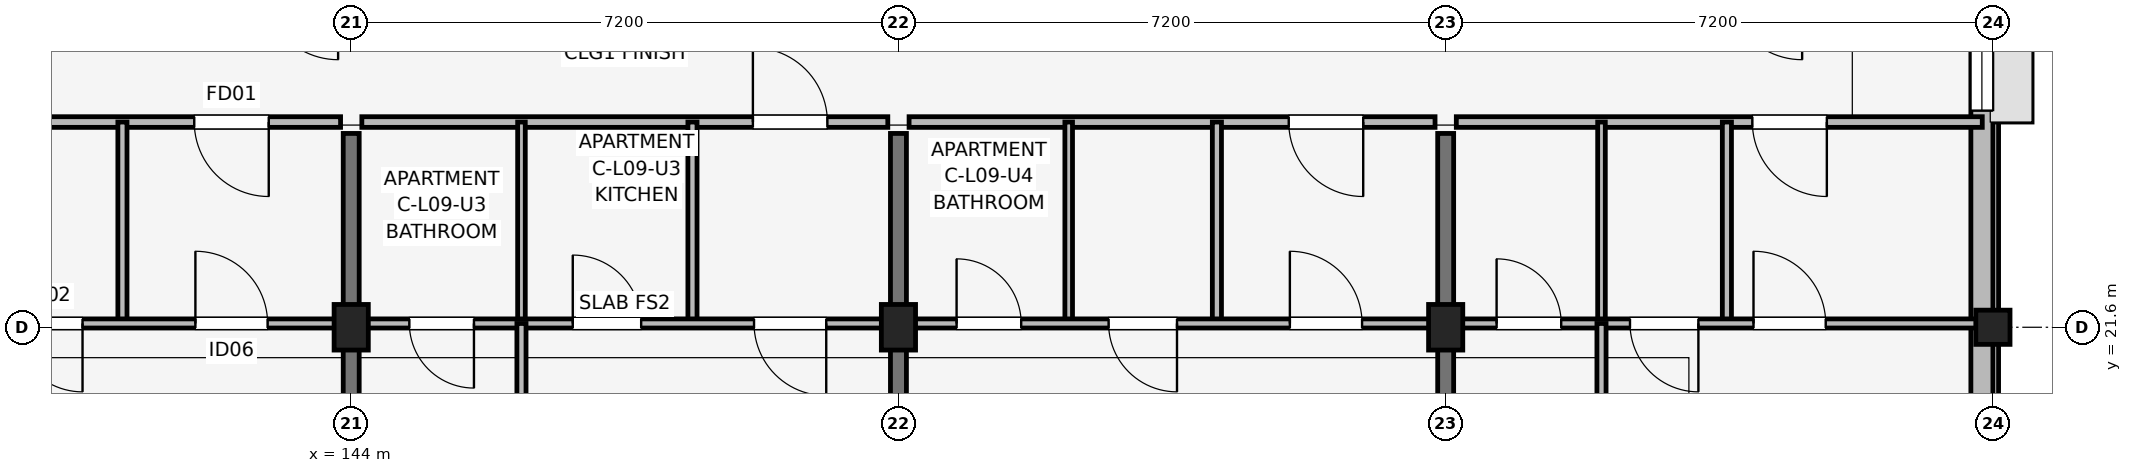
"""IFC4 building model, lengths in metres.
Left out: names, types, materials, properties, quantities, classifications, styles, units other than length and angle.
Written with IfcOpenShell. Run it as: python <this file> out.ifc"""

import sys

from ifc_helpers import new_model, si_unit, direction, frame, frame_2d, origin, origin_2d, place, context, subcontext, project, spatial, rectangle, extrude, element, fill, save


model = new_model("IFC4")
c1 = context("Model", 3, precision=1e-05, world=origin(), true_north=direction((0.0, 1.0)))
c2 = subcontext(c1, "Body", "Model", "MODEL_VIEW")
j1 = project(units=[si_unit("LENGTHUNIT", "METRE"), si_unit("PLANEANGLEUNIT", "RADIAN")], contexts=[c1])
p1 = place(None, origin())
s1 = spatial("IfcSite", under=j1, at=p1, CompositionType="ELEMENT")
p2 = place(p1, origin())
s2 = spatial("IfcBuilding", under=s1, at=p2, CompositionType="ELEMENT")
p3 = place(p2, frame((0.0, 0.0, 30.75)))
s3 = spatial("IfcBuildingStorey", under=s2, at=p3, CompositionType="ELEMENT", Elevation=30.75)
for number, where, z_axis, x_axis in (
    (1, (144.0, 21.6, 0.0), (0.0, 0.0, 1.0), (1.0, 0.0, 0.0)),
    (2, (151.2, 21.6, 0.0), (0.0, 0.0, 1.0), (1.0, 0.0, 0.0)),
    (3, (158.4, 21.6, 0.0), (0.0, 0.0, 1.0), (1.0, 0.0, 0.0)),
):
    element("IfcColumn", number, at=place(p3, frame(where, z_axis=z_axis, x_axis=x_axis)), inside=s3, PredefinedType="COLUMN", context=c2, shape_type="SweptSolid", body=[
        extrude(rectangle(XDim=0.45, YDim=0.6, at=origin_2d()), origin(), (0.0, 0.0, 1.0), 3.15),
    ])
p4 = place(p3, frame((165.6, 21.6, 0.0), z_axis=(0.0, 0.0, 1.0), x_axis=(1.0, 0.0, 0.0)))
e4 = element("IfcColumn", 4, at=p4, inside=s3, PredefinedType="COLUMN", context=c2, shape_type="SweptSolid", body=[
    extrude(rectangle(XDim=0.45, YDim=0.45, at=origin_2d()), origin(), (0.0, 0.0, 1.0), 3.15),
])
for number, where, z_axis, x_axis in (
    (5, (144.0, 14.75, 0.0), (0.0, 0.0, 1.0), (0.0, 1.0, 0.0)),
    (6, (151.2, 14.75, 0.0), (0.0, 0.0, 1.0), (0.0, 1.0, 0.0)),
    (7, (158.4, 14.75, 0.0), (0.0, 0.0, 1.0), (0.0, 1.0, 0.0)),
):
    element("IfcWall", number, at=place(p3, frame(where, z_axis=z_axis, x_axis=x_axis)), inside=s3, PredefinedType="SHEAR", context=c2, shape_type="SweptSolid", body=[
        extrude(rectangle(XDim=9.4, YDim=0.21, at=frame_2d((4.7, 0.0))), origin(), (0.0, 0.0, 1.0), 3.15),
    ])
p5 = place(p3, frame((165.455, 17.4, 0.0), z_axis=(0.0, 0.0, 1.0), x_axis=(0.0, 1.0, 0.0)))
e8 = element("IfcWall", 8, at=p5, inside=s3, PredefinedType="SOLIDWALL", context=c2, shape_type="SweptSolid", body=[
    extrude(rectangle(XDim=15.6, YDim=0.29, at=frame_2d((7.8, 0.0))), origin(), (0.0, 0.0, 1.0), 2.48),
])
p6 = place(p5, frame((7.05, 0.0, 1.05)))
e9 = element("IfcOpeningElement", 9, at=p6, cuts=e8, PredefinedType="OPENING", context=c2, shape_type="SweptSolid", body=[
    extrude(rectangle(XDim=1.5, YDim=1.15, at=frame_2d((0.75, 0.575))), frame((0.0, 0.155, 0.0), z_axis=(0.0, -1.0, 0.0), x_axis=(1.0, 0.0, 0.0)), (0.0, 0.0, 1.0), 0.31),
])
p7 = place(p5, frame((1.363, 0.0, 0.75)))
e10 = element("IfcOpeningElement", 10, at=p7, cuts=e8, PredefinedType="OPENING", context=c2, shape_type="SweptSolid", body=[
    extrude(rectangle(XDim=1.42, YDim=1.6, at=frame_2d((0.71, 0.8))), frame((0.0, 0.155, 0.0), z_axis=(0.0, -1.0, 0.0), x_axis=(1.0, 0.0, 0.0)), (0.0, 0.0, 1.0), 0.31),
])
p8 = place(p3, frame((136.94, 24.3, 0.0), z_axis=(0.0, 0.0, 1.0), x_axis=(1.0, 0.0, 0.0)))
e11 = element("IfcWall", 11, at=p8, inside=s3, PredefinedType="PARTITIONING", context=c2, shape_type="SweptSolid", body=[
    extrude(rectangle(XDim=6.92, YDim=0.14, at=frame_2d((3.46, 0.0))), origin(), (0.0, 0.0, 1.0), 2.38),
])
p9 = place(p8, frame((5.975, 0.0, 0.0), z_axis=(0.0, 0.0, 1.0), x_axis=(-1.0, 0.0, 0.0)))
e12 = element("IfcOpeningElement", 12, at=p9, cuts=e11, PredefinedType="OPENING", context=c2, shape_type="SweptSolid", body=[
    extrude(rectangle(XDim=0.98, YDim=2.1, at=frame_2d((0.49, 1.05))), frame((0.0, 0.08, 0.0), z_axis=(0.0, -1.0, 0.0), x_axis=(1.0, 0.0, 0.0)), (0.0, 0.0, 1.0), 0.16),
])
p10 = place(p3, frame((140.99, 21.65, 0.0), z_axis=(0.0, 0.0, 1.0), x_axis=(0.0, 1.0, 0.0)))
e13 = element("IfcWall", 13, at=p10, inside=s3, PredefinedType="PARTITIONING", context=c2, shape_type="SweptSolid", body=[
    extrude(rectangle(XDim=2.65, YDim=0.12, at=frame_2d((1.325, 0.0))), origin(), (0.0, 0.0, 1.0), 2.38),
])
p11 = place(p3, frame((136.94, 21.65, 0.0), z_axis=(0.0, 0.0, 1.0), x_axis=(1.0, 0.0, 0.0)))
e14 = element("IfcWall", 14, at=p11, inside=s3, PredefinedType="PARTITIONING", context=c2, shape_type="SweptSolid", body=[
    extrude(rectangle(XDim=6.92, YDim=0.12, at=frame_2d((3.46, 0.0))), origin(), (0.0, 0.0, 1.0), 2.38),
])
p12 = place(p11, frame((0.625, 0.0, 0.0)))
e15 = element("IfcOpeningElement", 15, at=p12, cuts=e14, PredefinedType="OPENING", context=c2, shape_type="SweptSolid", body=[
    extrude(rectangle(XDim=0.85, YDim=2.08, at=frame_2d((0.425, 1.04))), frame((0.0, 0.07, 0.0), z_axis=(0.0, -1.0, 0.0), x_axis=(1.0, 0.0, 0.0)), (0.0, 0.0, 1.0), 0.14),
])
p13 = place(p11, frame((3.525, 0.0, 0.0), z_axis=(0.0, 0.0, 1.0), x_axis=(-1.0, 0.0, 0.0)))
e16 = element("IfcOpeningElement", 16, at=p13, cuts=e14, PredefinedType="OPENING", context=c2, shape_type="SweptSolid", body=[
    extrude(rectangle(XDim=0.9, YDim=2.08, at=frame_2d((0.45, 1.04))), frame((0.0, 0.07, 0.0), z_axis=(0.0, -1.0, 0.0), x_axis=(1.0, 0.0, 0.0)), (0.0, 0.0, 1.0), 0.14),
])
p14 = place(p11, frame((5.01, 0.0, 0.0)))
e17 = element("IfcOpeningElement", 17, at=p14, cuts=e14, PredefinedType="OPENING", context=c2, shape_type="SweptSolid", body=[
    extrude(rectangle(XDim=0.95, YDim=2.08, at=frame_2d((0.475, 1.04))), frame((0.0, 0.07, 0.0), z_axis=(0.0, -1.0, 0.0), x_axis=(1.0, 0.0, 0.0)), (0.0, 0.0, 1.0), 0.14),
])
p15 = place(p3, frame((144.14, 24.3, 0.0), z_axis=(0.0, 0.0, 1.0), x_axis=(1.0, 0.0, 0.0)))
e18 = element("IfcWall", 18, at=p15, inside=s3, PredefinedType="PARTITIONING", context=c2, shape_type="SweptSolid", body=[
    extrude(rectangle(XDim=6.92, YDim=0.14, at=frame_2d((3.46, 0.0))), origin(), (0.0, 0.0, 1.0), 2.38),
])
p16 = place(p15, frame((5.145, 0.0, 0.0)))
e19 = element("IfcOpeningElement", 19, at=p16, cuts=e18, PredefinedType="OPENING", context=c2, shape_type="SweptSolid", body=[
    extrude(rectangle(XDim=0.98, YDim=2.1, at=frame_2d((0.49, 1.05))), frame((0.0, 0.08, 0.0), z_axis=(0.0, -1.0, 0.0), x_axis=(1.0, 0.0, 0.0)), (0.0, 0.0, 1.0), 0.16),
])
p17 = place(p3, frame((146.24, 21.65, 0.0), z_axis=(0.0, 0.0, 1.0), x_axis=(0.0, 1.0, 0.0)))
e20 = element("IfcWall", 20, at=p17, inside=s3, PredefinedType="PARTITIONING", context=c2, shape_type="SweptSolid", body=[
    extrude(rectangle(XDim=2.65, YDim=0.1, at=frame_2d((1.325, 0.0))), origin(), (0.0, 0.0, 1.0), 2.38),
])
p18 = place(p3, frame((148.49, 21.65, 0.0), z_axis=(0.0, 0.0, 1.0), x_axis=(0.0, 1.0, 0.0)))
e21 = element("IfcWall", 21, at=p18, inside=s3, PredefinedType="PARTITIONING", context=c2, shape_type="SweptSolid", body=[
    extrude(rectangle(XDim=2.65, YDim=0.12, at=frame_2d((1.325, 0.0))), origin(), (0.0, 0.0, 1.0), 2.38),
])
p19 = place(p3, frame((144.14, 21.65, 0.0), z_axis=(0.0, 0.0, 1.0), x_axis=(1.0, 0.0, 0.0)))
e22 = element("IfcWall", 22, at=p19, inside=s3, PredefinedType="PARTITIONING", context=c2, shape_type="SweptSolid", body=[
    extrude(rectangle(XDim=6.92, YDim=0.12, at=frame_2d((3.46, 0.0))), origin(), (0.0, 0.0, 1.0), 2.38),
])
p20 = place(p19, frame((1.475, 0.0, 0.0), z_axis=(0.0, 0.0, 1.0), x_axis=(-1.0, 0.0, 0.0)))
e23 = element("IfcOpeningElement", 23, at=p20, cuts=e22, PredefinedType="OPENING", context=c2, shape_type="SweptSolid", body=[
    extrude(rectangle(XDim=0.85, YDim=2.08, at=frame_2d((0.425, 1.04))), frame((0.0, 0.07, 0.0), z_axis=(0.0, -1.0, 0.0), x_axis=(1.0, 0.0, 0.0)), (0.0, 0.0, 1.0), 0.14),
])
p21 = place(p19, frame((2.775, 0.0, 0.0)))
e24 = element("IfcOpeningElement", 24, at=p21, cuts=e22, PredefinedType="OPENING", context=c2, shape_type="SweptSolid", body=[
    extrude(rectangle(XDim=0.9, YDim=2.08, at=frame_2d((0.45, 1.04))), frame((0.0, 0.07, 0.0), z_axis=(0.0, -1.0, 0.0), x_axis=(1.0, 0.0, 0.0)), (0.0, 0.0, 1.0), 0.14),
])
p22 = place(p19, frame((6.11, 0.0, 0.0), z_axis=(0.0, 0.0, 1.0), x_axis=(-1.0, 0.0, 0.0)))
e25 = element("IfcOpeningElement", 25, at=p22, cuts=e22, PredefinedType="OPENING", context=c2, shape_type="SweptSolid", body=[
    extrude(rectangle(XDim=0.95, YDim=2.08, at=frame_2d((0.475, 1.04))), frame((0.0, 0.07, 0.0), z_axis=(0.0, -1.0, 0.0), x_axis=(1.0, 0.0, 0.0)), (0.0, 0.0, 1.0), 0.14),
])
p23 = place(p3, frame((146.24, 14.7, 0.0), z_axis=(0.0, 0.0, 1.0), x_axis=(0.0, 1.0, 0.0)))
e26 = element("IfcWall", 26, at=p23, inside=s3, PredefinedType="PARTITIONING", context=c2, shape_type="SweptSolid", body=[
    extrude(rectangle(XDim=6.95, YDim=0.12, at=frame_2d((3.475, 0.0))), origin(), (0.0, 0.0, 1.0), 2.38),
])
p24 = place(p23, frame((3.025, 0.0, 0.0)))
e27 = element("IfcOpeningElement", 27, at=p24, cuts=e26, PredefinedType="OPENING", context=c2, shape_type="SweptSolid", body=[
    extrude(rectangle(XDim=0.9, YDim=2.08, at=frame_2d((0.45, 1.04))), frame((0.0, 0.07, 0.0), z_axis=(0.0, -1.0, 0.0), x_axis=(1.0, 0.0, 0.0)), (0.0, 0.0, 1.0), 0.14),
])
p25 = place(p3, frame((151.34, 24.3, 0.0), z_axis=(0.0, 0.0, 1.0), x_axis=(1.0, 0.0, 0.0)))
e28 = element("IfcWall", 28, at=p25, inside=s3, PredefinedType="PARTITIONING", context=c2, shape_type="SweptSolid", body=[
    extrude(rectangle(XDim=6.92, YDim=0.14, at=frame_2d((3.46, 0.0))), origin(), (0.0, 0.0, 1.0), 2.38),
])
p26 = place(p25, frame((5.975, 0.0, 0.0), z_axis=(0.0, 0.0, 1.0), x_axis=(-1.0, 0.0, 0.0)))
e29 = element("IfcOpeningElement", 29, at=p26, cuts=e28, PredefinedType="OPENING", context=c2, shape_type="SweptSolid", body=[
    extrude(rectangle(XDim=0.98, YDim=2.1, at=frame_2d((0.49, 1.05))), frame((0.0, 0.08, 0.0), z_axis=(0.0, -1.0, 0.0), x_axis=(1.0, 0.0, 0.0)), (0.0, 0.0, 1.0), 0.16),
])
p27 = place(p3, frame((153.44, 21.65, 0.0), z_axis=(0.0, 0.0, 1.0), x_axis=(0.0, 1.0, 0.0)))
e30 = element("IfcWall", 30, at=p27, inside=s3, PredefinedType="PARTITIONING", context=c2, shape_type="SweptSolid", body=[
    extrude(rectangle(XDim=2.65, YDim=0.1, at=frame_2d((1.325, 0.0))), origin(), (0.0, 0.0, 1.0), 2.38),
])
p28 = place(p3, frame((155.39, 21.65, 0.0), z_axis=(0.0, 0.0, 1.0), x_axis=(0.0, 1.0, 0.0)))
e31 = element("IfcWall", 31, at=p28, inside=s3, PredefinedType="PARTITIONING", context=c2, shape_type="SweptSolid", body=[
    extrude(rectangle(XDim=2.65, YDim=0.12, at=frame_2d((1.325, 0.0))), origin(), (0.0, 0.0, 1.0), 2.38),
])
p29 = place(p3, frame((151.34, 21.65, 0.0), z_axis=(0.0, 0.0, 1.0), x_axis=(1.0, 0.0, 0.0)))
e32 = element("IfcWall", 32, at=p29, inside=s3, PredefinedType="PARTITIONING", context=c2, shape_type="SweptSolid", body=[
    extrude(rectangle(XDim=6.92, YDim=0.12, at=frame_2d((3.46, 0.0))), origin(), (0.0, 0.0, 1.0), 2.38),
])
p30 = place(p29, frame((0.625, 0.0, 0.0)))
e33 = element("IfcOpeningElement", 33, at=p30, cuts=e32, PredefinedType="OPENING", context=c2, shape_type="SweptSolid", body=[
    extrude(rectangle(XDim=0.85, YDim=2.08, at=frame_2d((0.425, 1.04))), frame((0.0, 0.07, 0.0), z_axis=(0.0, -1.0, 0.0), x_axis=(1.0, 0.0, 0.0)), (0.0, 0.0, 1.0), 0.14),
])
p31 = place(p29, frame((3.525, 0.0, 0.0), z_axis=(0.0, 0.0, 1.0), x_axis=(-1.0, 0.0, 0.0)))
e34 = element("IfcOpeningElement", 34, at=p31, cuts=e32, PredefinedType="OPENING", context=c2, shape_type="SweptSolid", body=[
    extrude(rectangle(XDim=0.9, YDim=2.08, at=frame_2d((0.45, 1.04))), frame((0.0, 0.07, 0.0), z_axis=(0.0, -1.0, 0.0), x_axis=(1.0, 0.0, 0.0)), (0.0, 0.0, 1.0), 0.14),
])
p32 = place(p29, frame((5.01, 0.0, 0.0)))
e35 = element("IfcOpeningElement", 35, at=p32, cuts=e32, PredefinedType="OPENING", context=c2, shape_type="SweptSolid", body=[
    extrude(rectangle(XDim=0.95, YDim=2.08, at=frame_2d((0.475, 1.04))), frame((0.0, 0.07, 0.0), z_axis=(0.0, -1.0, 0.0), x_axis=(1.0, 0.0, 0.0)), (0.0, 0.0, 1.0), 0.14),
])
p33 = place(p3, frame((158.54, 24.3, 0.0), z_axis=(0.0, 0.0, 1.0), x_axis=(1.0, 0.0, 0.0)))
e36 = element("IfcWall", 36, at=p33, inside=s3, PredefinedType="PARTITIONING", context=c2, shape_type="SweptSolid", body=[
    extrude(rectangle(XDim=6.92, YDim=0.14, at=frame_2d((3.46, 0.0))), origin(), (0.0, 0.0, 1.0), 2.38),
])
p34 = place(p33, frame((4.875, 0.0, 0.0), z_axis=(0.0, 0.0, 1.0), x_axis=(-1.0, 0.0, 0.0)))
e37 = element("IfcOpeningElement", 37, at=p34, cuts=e36, PredefinedType="OPENING", context=c2, shape_type="SweptSolid", body=[
    extrude(rectangle(XDim=0.98, YDim=2.1, at=frame_2d((0.49, 1.05))), frame((0.0, 0.08, 0.0), z_axis=(0.0, -1.0, 0.0), x_axis=(1.0, 0.0, 0.0)), (0.0, 0.0, 1.0), 0.16),
])
p35 = place(p3, frame((160.45, 21.65, 0.0), z_axis=(0.0, 0.0, 1.0), x_axis=(0.0, 1.0, 0.0)))
e38 = element("IfcWall", 38, at=p35, inside=s3, PredefinedType="PARTITIONING", context=c2, shape_type="SweptSolid", body=[
    extrude(rectangle(XDim=2.65, YDim=0.1, at=frame_2d((1.325, 0.0))), origin(), (0.0, 0.0, 1.0), 2.38),
])
p36 = place(p3, frame((162.1, 21.65, 0.0), z_axis=(0.0, 0.0, 1.0), x_axis=(0.0, 1.0, 0.0)))
e39 = element("IfcWall", 39, at=p36, inside=s3, PredefinedType="PARTITIONING", context=c2, shape_type="SweptSolid", body=[
    extrude(rectangle(XDim=2.65, YDim=0.12, at=frame_2d((1.325, 0.0))), origin(), (0.0, 0.0, 1.0), 2.38),
])
p37 = place(p3, frame((158.54, 21.65, 0.0), z_axis=(0.0, 0.0, 1.0), x_axis=(1.0, 0.0, 0.0)))
e40 = element("IfcWall", 40, at=p37, inside=s3, PredefinedType="PARTITIONING", context=c2, shape_type="SweptSolid", body=[
    extrude(rectangle(XDim=6.92, YDim=0.12, at=frame_2d((3.46, 0.0))), origin(), (0.0, 0.0, 1.0), 2.38),
])
p38 = place(p37, frame((0.53, 0.0, 0.0)))
e41 = element("IfcOpeningElement", 41, at=p38, cuts=e40, PredefinedType="OPENING", context=c2, shape_type="SweptSolid", body=[
    extrude(rectangle(XDim=0.85, YDim=2.08, at=frame_2d((0.425, 1.04))), frame((0.0, 0.07, 0.0), z_axis=(0.0, -1.0, 0.0), x_axis=(1.0, 0.0, 0.0)), (0.0, 0.0, 1.0), 0.14),
])
p39 = place(p37, frame((3.185, 0.0, 0.0), z_axis=(0.0, 0.0, 1.0), x_axis=(-1.0, 0.0, 0.0)))
e42 = element("IfcOpeningElement", 42, at=p39, cuts=e40, PredefinedType="OPENING", context=c2, shape_type="SweptSolid", body=[
    extrude(rectangle(XDim=0.9, YDim=2.08, at=frame_2d((0.45, 1.04))), frame((0.0, 0.07, 0.0), z_axis=(0.0, -1.0, 0.0), x_axis=(1.0, 0.0, 0.0)), (0.0, 0.0, 1.0), 0.14),
])
p40 = place(p37, frame((3.91, 0.0, 0.0)))
e43 = element("IfcOpeningElement", 43, at=p40, cuts=e40, PredefinedType="OPENING", context=c2, shape_type="SweptSolid", body=[
    extrude(rectangle(XDim=0.95, YDim=2.08, at=frame_2d((0.475, 1.04))), frame((0.0, 0.07, 0.0), z_axis=(0.0, -1.0, 0.0), x_axis=(1.0, 0.0, 0.0)), (0.0, 0.0, 1.0), 0.14),
])
p41 = place(p3, frame((160.45, 14.7, 0.0), z_axis=(0.0, 0.0, 1.0), x_axis=(0.0, 1.0, 0.0)))
e44 = element("IfcWall", 44, at=p41, inside=s3, PredefinedType="PARTITIONING", context=c2, shape_type="SweptSolid", body=[
    extrude(rectangle(XDim=6.95, YDim=0.12, at=frame_2d((3.475, 0.0))), origin(), (0.0, 0.0, 1.0), 2.38),
])
p42 = place(p41, frame((3.025, 0.0, 0.0)))
e45 = element("IfcOpeningElement", 45, at=p42, cuts=e44, PredefinedType="OPENING", context=c2, shape_type="SweptSolid", body=[
    extrude(rectangle(XDim=0.9, YDim=2.08, at=frame_2d((0.45, 1.04))), frame((0.0, 0.07, 0.0), z_axis=(0.0, -1.0, 0.0), x_axis=(1.0, 0.0, 0.0)), (0.0, 0.0, 1.0), 0.14),
])
p43 = place(p6, origin())
e46 = element("IfcWindow", 46, at=p43, inside=s3, PartitioningType="SINGLE_PANEL", PredefinedType="WINDOW", context=c2, shape_type="SweptSolid", body=[
    extrude(rectangle(XDim=1.5, YDim=1.15, at=frame_2d((0.75, 0.575))), frame((0.0, 0.03, 0.0), z_axis=(0.0, -1.0, 0.0), x_axis=(1.0, 0.0, 0.0)), (0.0, 0.0, 1.0), 0.06),
])
fill(e9, e46)
p44 = place(p9, origin())
e47 = element("IfcDoor", 47, at=p44, inside=s3, OperationType="SINGLE_SWING_RIGHT", PredefinedType="DOOR", context=c2, shape_type="SweptSolid", body=[
    extrude(rectangle(XDim=0.98, YDim=2.1, at=frame_2d((0.49, 1.05))), frame((0.0, 0.025, 0.0), z_axis=(0.0, -1.0, 0.0), x_axis=(1.0, 0.0, 0.0)), (0.0, 0.0, 1.0), 0.05),
])
fill(e12, e47)
p45 = place(p13, origin())
e48 = element("IfcDoor", 48, at=p45, inside=s3, OperationType="SINGLE_SWING_RIGHT", PredefinedType="DOOR", context=c2, shape_type="SweptSolid", body=[
    extrude(rectangle(XDim=0.9, YDim=2.08, at=frame_2d((0.45, 1.04))), frame((0.0, 0.025, 0.0), z_axis=(0.0, -1.0, 0.0), x_axis=(1.0, 0.0, 0.0)), (0.0, 0.0, 1.0), 0.05),
])
fill(e16, e48)
p46 = place(p14, origin())
e49 = element("IfcDoor", 49, at=p46, inside=s3, OperationType="SINGLE_SWING_LEFT", PredefinedType="DOOR", context=c2, shape_type="SweptSolid", body=[
    extrude(rectangle(XDim=0.95, YDim=2.08, at=frame_2d((0.475, 1.04))), frame((0.0, 0.025, 0.0), z_axis=(0.0, -1.0, 0.0), x_axis=(1.0, 0.0, 0.0)), (0.0, 0.0, 1.0), 0.05),
])
fill(e17, e49)
p47 = place(p16, origin())
e50 = element("IfcDoor", 50, at=p47, inside=s3, OperationType="SINGLE_SWING_LEFT", PredefinedType="DOOR", context=c2, shape_type="SweptSolid", body=[
    extrude(rectangle(XDim=0.98, YDim=2.1, at=frame_2d((0.49, 1.05))), frame((0.0, 0.025, 0.0), z_axis=(0.0, -1.0, 0.0), x_axis=(1.0, 0.0, 0.0)), (0.0, 0.0, 1.0), 0.05),
])
fill(e19, e50)
p48 = place(p20, origin())
e51 = element("IfcDoor", 51, at=p48, inside=s3, OperationType="SINGLE_SWING_RIGHT", PredefinedType="DOOR", context=c2, shape_type="SweptSolid", body=[
    extrude(rectangle(XDim=0.85, YDim=2.08, at=frame_2d((0.425, 1.04))), frame((0.0, 0.025, 0.0), z_axis=(0.0, -1.0, 0.0), x_axis=(1.0, 0.0, 0.0)), (0.0, 0.0, 1.0), 0.05),
])
fill(e23, e51)
p49 = place(p21, origin())
e52 = element("IfcDoor", 52, at=p49, inside=s3, OperationType="SINGLE_SWING_LEFT", PredefinedType="DOOR", context=c2, shape_type="SweptSolid", body=[
    extrude(rectangle(XDim=0.9, YDim=2.08, at=frame_2d((0.45, 1.04))), frame((0.0, 0.025, 0.0), z_axis=(0.0, -1.0, 0.0), x_axis=(1.0, 0.0, 0.0)), (0.0, 0.0, 1.0), 0.05),
])
fill(e24, e52)
p50 = place(p22, origin())
e53 = element("IfcDoor", 53, at=p50, inside=s3, OperationType="SINGLE_SWING_RIGHT", PredefinedType="DOOR", context=c2, shape_type="SweptSolid", body=[
    extrude(rectangle(XDim=0.95, YDim=2.08, at=frame_2d((0.475, 1.04))), frame((0.0, 0.025, 0.0), z_axis=(0.0, -1.0, 0.0), x_axis=(1.0, 0.0, 0.0)), (0.0, 0.0, 1.0), 0.05),
])
fill(e25, e53)
p51 = place(p26, origin())
e54 = element("IfcDoor", 54, at=p51, inside=s3, OperationType="SINGLE_SWING_RIGHT", PredefinedType="DOOR", context=c2, shape_type="SweptSolid", body=[
    extrude(rectangle(XDim=0.98, YDim=2.1, at=frame_2d((0.49, 1.05))), frame((0.0, 0.025, 0.0), z_axis=(0.0, -1.0, 0.0), x_axis=(1.0, 0.0, 0.0)), (0.0, 0.0, 1.0), 0.05),
])
fill(e29, e54)
p52 = place(p30, origin())
e55 = element("IfcDoor", 55, at=p52, inside=s3, OperationType="SINGLE_SWING_LEFT", PredefinedType="DOOR", context=c2, shape_type="SweptSolid", body=[
    extrude(rectangle(XDim=0.85, YDim=2.08, at=frame_2d((0.425, 1.04))), frame((0.0, 0.025, 0.0), z_axis=(0.0, -1.0, 0.0), x_axis=(1.0, 0.0, 0.0)), (0.0, 0.0, 1.0), 0.05),
])
fill(e33, e55)
p53 = place(p31, origin())
e56 = element("IfcDoor", 56, at=p53, inside=s3, OperationType="SINGLE_SWING_RIGHT", PredefinedType="DOOR", context=c2, shape_type="SweptSolid", body=[
    extrude(rectangle(XDim=0.9, YDim=2.08, at=frame_2d((0.45, 1.04))), frame((0.0, 0.025, 0.0), z_axis=(0.0, -1.0, 0.0), x_axis=(1.0, 0.0, 0.0)), (0.0, 0.0, 1.0), 0.05),
])
fill(e34, e56)
p54 = place(p32, origin())
e57 = element("IfcDoor", 57, at=p54, inside=s3, OperationType="SINGLE_SWING_LEFT", PredefinedType="DOOR", context=c2, shape_type="SweptSolid", body=[
    extrude(rectangle(XDim=0.95, YDim=2.08, at=frame_2d((0.475, 1.04))), frame((0.0, 0.025, 0.0), z_axis=(0.0, -1.0, 0.0), x_axis=(1.0, 0.0, 0.0)), (0.0, 0.0, 1.0), 0.05),
])
fill(e35, e57)
p55 = place(p34, origin())
e58 = element("IfcDoor", 58, at=p55, inside=s3, OperationType="SINGLE_SWING_RIGHT", PredefinedType="DOOR", context=c2, shape_type="SweptSolid", body=[
    extrude(rectangle(XDim=0.98, YDim=2.1, at=frame_2d((0.49, 1.05))), frame((0.0, 0.025, 0.0), z_axis=(0.0, -1.0, 0.0), x_axis=(1.0, 0.0, 0.0)), (0.0, 0.0, 1.0), 0.05),
])
fill(e37, e58)
p56 = place(p38, origin())
e59 = element("IfcDoor", 59, at=p56, inside=s3, OperationType="SINGLE_SWING_LEFT", PredefinedType="DOOR", context=c2, shape_type="SweptSolid", body=[
    extrude(rectangle(XDim=0.85, YDim=2.08, at=frame_2d((0.425, 1.04))), frame((0.0, 0.025, 0.0), z_axis=(0.0, -1.0, 0.0), x_axis=(1.0, 0.0, 0.0)), (0.0, 0.0, 1.0), 0.05),
])
fill(e41, e59)
p57 = place(p39, origin())
e60 = element("IfcDoor", 60, at=p57, inside=s3, OperationType="SINGLE_SWING_RIGHT", PredefinedType="DOOR", context=c2, shape_type="SweptSolid", body=[
    extrude(rectangle(XDim=0.9, YDim=2.08, at=frame_2d((0.45, 1.04))), frame((0.0, 0.025, 0.0), z_axis=(0.0, -1.0, 0.0), x_axis=(1.0, 0.0, 0.0)), (0.0, 0.0, 1.0), 0.05),
])
fill(e42, e60)
p58 = place(p40, origin())
e61 = element("IfcDoor", 61, at=p58, inside=s3, OperationType="SINGLE_SWING_LEFT", PredefinedType="DOOR", context=c2, shape_type="SweptSolid", body=[
    extrude(rectangle(XDim=0.95, YDim=2.08, at=frame_2d((0.475, 1.04))), frame((0.0, 0.025, 0.0), z_axis=(0.0, -1.0, 0.0), x_axis=(1.0, 0.0, 0.0)), (0.0, 0.0, 1.0), 0.05),
])
fill(e43, e61)
save(model, sys.argv[1])
